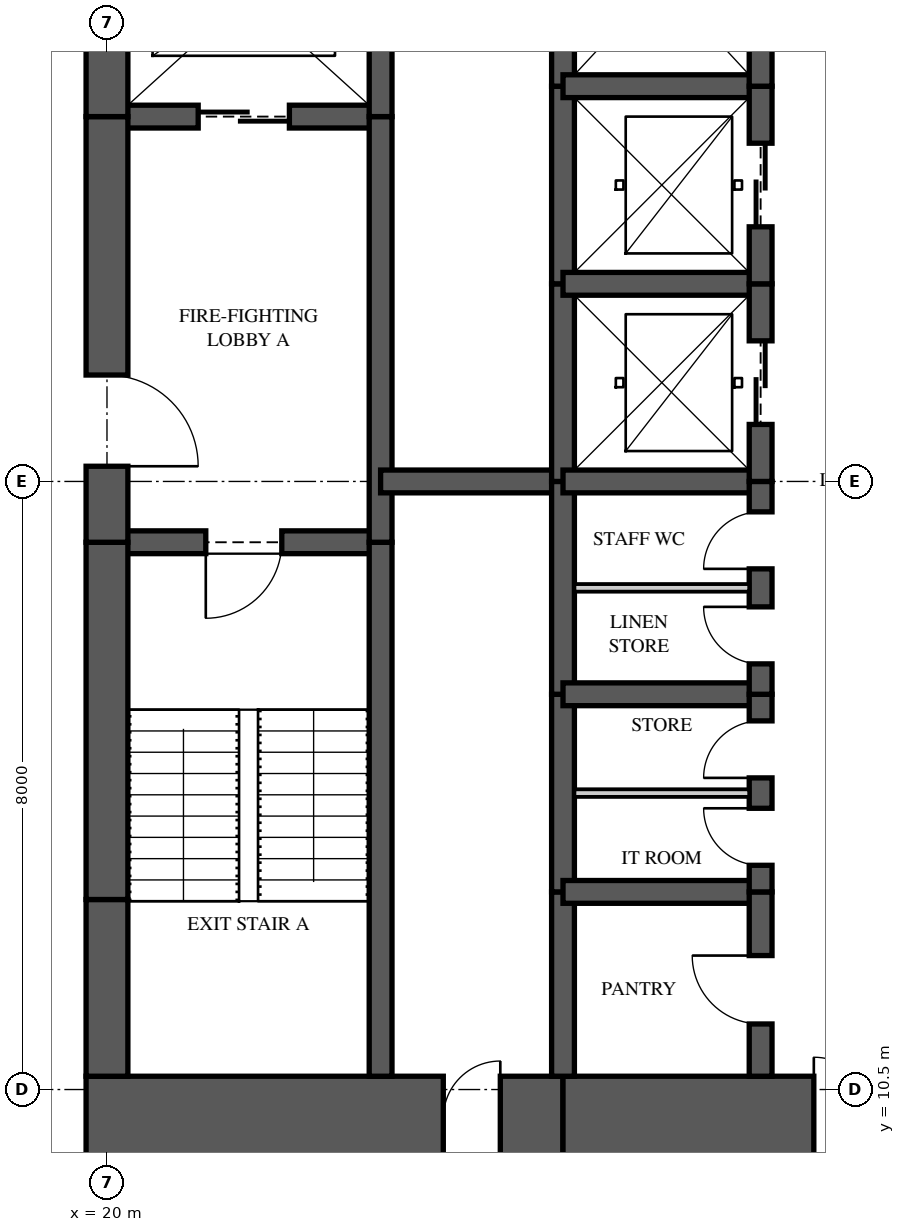
"""IFC4 building model, lengths in metres.
Left out: names, types, materials, properties, quantities, classifications, styles, units other than length and angle.
Written with IfcOpenShell. Run it as: python <this file> out.ifc"""

import sys

from ifc_helpers import new_model, si_unit, direction, frame, frame_2d, origin, place, context, subcontext, project, spatial, rectangle, extrude, element, fill, save


model = new_model("IFC4")
c1 = context("Model", 3, precision=1e-05, world=origin(), true_north=direction((0.0, 1.0)))
c2 = subcontext(c1, "Body", "Model", "MODEL_VIEW")
j1 = project(units=[si_unit("LENGTHUNIT", "METRE"), si_unit("PLANEANGLEUNIT", "RADIAN")], contexts=[c1])
p1 = place(None, origin())
s1 = spatial("IfcSite", under=j1, at=p1, CompositionType="ELEMENT")
p2 = place(p1, origin())
s2 = spatial("IfcBuilding", under=s1, at=p2, CompositionType="ELEMENT")
p3 = place(p2, frame((0.0, 0.0, 235.45)))
s3 = spatial("IfcBuildingStorey", under=s2, at=p3, CompositionType="ELEMENT", Elevation=235.45)
p4 = place(p3, frame((19.725, 10.125, 0.0), z_axis=(0.0, 0.0, 1.0), x_axis=(1.0, 0.0, 0.0)))
e1 = element("IfcWall", 1, at=p4, inside=s3, PredefinedType="SHEAR", context=c2, shape_type="SweptSolid", body=[
    extrude(rectangle(XDim=6.275, YDim=1.1, at=frame_2d((3.137, 0.0))), origin(), (0.0, 0.0, 1.0), 3.5),
])
p5 = place(p4, frame((4.7, 0.0, 0.0)))
e2 = element("IfcOpeningElement", 2, at=p5, cuts=e1, PredefinedType="OPENING", context=c2, shape_type="SweptSolid", body=[
    extrude(rectangle(XDim=0.75, YDim=2.1, at=frame_2d((0.375, 1.05))), frame((0.0, 0.56, 0.0), z_axis=(0.0, -1.0, 0.0), x_axis=(1.0, 0.0, 0.0)), (0.0, 0.0, 1.0), 1.12),
])
p6 = place(p3, frame((26.0, 10.125, 0.0), z_axis=(0.0, 0.0, 1.0), x_axis=(1.0, 0.0, 0.0)))
e3 = element("IfcWall", 3, at=p6, inside=s3, PredefinedType="SHEAR", context=c2, shape_type="SweptSolid", body=[
    extrude(rectangle(XDim=5.6, YDim=1.1, at=frame_2d((2.8, 0.0))), origin(), (0.0, 0.0, 1.0), 3.5),
])
p7 = place(p6, frame((3.3, 0.0, 0.0)))
e4 = element("IfcOpeningElement", 4, at=p7, cuts=e3, PredefinedType="OPENING", context=c2, shape_type="SweptSolid", body=[
    extrude(rectangle(XDim=1.6, YDim=2.1, at=frame_2d((0.8, 1.05))), frame((0.0, 0.56, 0.0), z_axis=(0.0, -1.0, 0.0), x_axis=(1.0, 0.0, 0.0)), (0.0, 0.0, 1.0), 1.12),
])
p8 = place(p3, frame((20.0, 26.325, 0.0), z_axis=(0.0, 0.0, 1.0), x_axis=(0.0, -1.0, 0.0)))
e5 = element("IfcWall", 5, at=p8, inside=s3, PredefinedType="SHEAR", context=c2, shape_type="SweptSolid", body=[
    extrude(rectangle(XDim=3.025, YDim=0.55, at=frame_2d((1.512, 0.0))), origin(), (0.0, 0.0, 1.0), 3.5),
])
p9 = place(p3, frame((20.0, 23.3, 0.0), z_axis=(0.0, 0.0, 1.0), x_axis=(0.0, -1.0, 0.0)))
e6 = element("IfcWall", 6, at=p9, inside=s3, PredefinedType="SHEAR", context=c2, shape_type="SweptSolid", body=[
    extrude(rectangle(XDim=5.6, YDim=0.55, at=frame_2d((2.8, 0.0))), origin(), (0.0, 0.0, 1.0), 3.5),
])
p10 = place(p9, frame((3.4, 0.0, 0.0)))
e7 = element("IfcOpeningElement", 7, at=p10, cuts=e6, PredefinedType="OPENING", context=c2, shape_type="SweptSolid", body=[
    extrude(rectangle(XDim=1.2, YDim=2.2, at=frame_2d((0.6, 1.1))), frame((0.0, 0.285, 0.0), z_axis=(0.0, -1.0, 0.0), x_axis=(1.0, 0.0, 0.0)), (0.0, 0.0, 1.0), 0.57),
])
p11 = place(p3, frame((20.0, 17.7, 0.0), z_axis=(0.0, 0.0, 1.0), x_axis=(0.0, -1.0, 0.0)))
e8 = element("IfcWall", 8, at=p11, inside=s3, PredefinedType="SHEAR", context=c2, shape_type="SweptSolid", body=[
    extrude(rectangle(XDim=4.7, YDim=0.55, at=frame_2d((2.35, 0.0))), origin(), (0.0, 0.0, 1.0), 3.5),
])
p12 = place(p3, frame((20.0, 13.0, 0.0), z_axis=(0.0, 0.0, 1.0), x_axis=(0.0, -1.0, 0.0)))
e9 = element("IfcWall", 9, at=p12, inside=s3, PredefinedType="SHEAR", context=c2, shape_type="SweptSolid", body=[
    extrude(rectangle(XDim=2.325, YDim=0.55, at=frame_2d((1.163, 0.0))), origin(), (0.0, 0.0, 1.0), 3.5),
])
p13 = place(p3, frame((23.6, 10.675, 0.0), z_axis=(0.0, 0.0, 1.0), x_axis=(0.0, 1.0, 0.0)))
e10 = element("IfcWall", 10, at=p13, inside=s3, PredefinedType="SHEAR", context=c2, shape_type="SweptSolid", body=[
    extrude(rectangle(XDim=7.025, YDim=0.3, at=frame_2d((3.512, 0.0))), origin(), (0.0, 0.0, 1.0), 3.5),
])
p14 = place(p3, frame((23.6, 17.7, 0.0), z_axis=(0.0, 0.0, 1.0), x_axis=(0.0, 1.0, 0.0)))
e11 = element("IfcWall", 11, at=p14, inside=s3, PredefinedType="SHEAR", context=c2, shape_type="SweptSolid", body=[
    extrude(rectangle(XDim=5.6, YDim=0.3, at=frame_2d((2.8, 0.0))), origin(), (0.0, 0.0, 1.0), 3.5),
])
p15 = place(p3, frame((23.6, 23.3, 0.0), z_axis=(0.0, 0.0, 1.0), x_axis=(0.0, 1.0, 0.0)))
e12 = element("IfcWall", 12, at=p15, inside=s3, PredefinedType="SHEAR", context=c2, shape_type="SweptSolid", body=[
    extrude(rectangle(XDim=3.025, YDim=0.3, at=frame_2d((1.512, 0.0))), origin(), (0.0, 0.0, 1.0), 3.5),
])
p16 = place(p3, frame((26.0, 10.675, 0.0), z_axis=(0.0, 0.0, 1.0), x_axis=(0.0, 1.0, 0.0)))
e13 = element("IfcWall", 13, at=p16, inside=s3, PredefinedType="SHEAR", context=c2, shape_type="SweptSolid", body=[
    extrude(rectangle(XDim=2.425, YDim=0.3, at=frame_2d((1.212, 0.0))), origin(), (0.0, 0.0, 1.0), 3.5),
])
p17 = place(p3, frame((26.0, 13.1, 0.0), z_axis=(0.0, 0.0, 1.0), x_axis=(0.0, 1.0, 0.0)))
e14 = element("IfcWall", 14, at=p17, inside=s3, PredefinedType="SHEAR", context=c2, shape_type="SweptSolid", body=[
    extrude(rectangle(XDim=2.6, YDim=0.3, at=frame_2d((1.3, 0.0))), origin(), (0.0, 0.0, 1.0), 3.5),
])
p18 = place(p3, frame((26.0, 15.7, 0.0), z_axis=(0.0, 0.0, 1.0), x_axis=(0.0, 1.0, 0.0)))
e15 = element("IfcWall", 15, at=p18, inside=s3, PredefinedType="SHEAR", context=c2, shape_type="SweptSolid", body=[
    extrude(rectangle(XDim=2.8, YDim=0.3, at=frame_2d((1.4, 0.0))), origin(), (0.0, 0.0, 1.0), 3.5),
])
p19 = place(p3, frame((26.0, 18.5, 0.0), z_axis=(0.0, 0.0, 1.0), x_axis=(0.0, 1.0, 0.0)))
e16 = element("IfcWall", 16, at=p19, inside=s3, PredefinedType="SHEAR", context=c2, shape_type="SweptSolid", body=[
    extrude(rectangle(XDim=2.6, YDim=0.3, at=frame_2d((1.3, 0.0))), origin(), (0.0, 0.0, 1.0), 3.5),
])
p20 = place(p3, frame((26.0, 21.1, 0.0), z_axis=(0.0, 0.0, 1.0), x_axis=(0.0, 1.0, 0.0)))
e17 = element("IfcWall", 17, at=p20, inside=s3, PredefinedType="SHEAR", context=c2, shape_type="SweptSolid", body=[
    extrude(rectangle(XDim=2.6, YDim=0.3, at=frame_2d((1.3, 0.0))), origin(), (0.0, 0.0, 1.0), 3.5),
])
p21 = place(p3, frame((26.0, 23.7, 0.0), z_axis=(0.0, 0.0, 1.0), x_axis=(0.0, 1.0, 0.0)))
e18 = element("IfcWall", 18, at=p21, inside=s3, PredefinedType="SHEAR", context=c2, shape_type="SweptSolid", body=[
    extrude(rectangle(XDim=2.625, YDim=0.3, at=frame_2d((1.312, 0.0))), origin(), (0.0, 0.0, 1.0), 3.5),
])
p22 = place(p3, frame((28.6, 10.675, 0.0), z_axis=(0.0, 0.0, 1.0), x_axis=(0.0, 1.0, 0.0)))
e19 = element("IfcWall", 19, at=p22, inside=s3, PredefinedType="SHEAR", context=c2, shape_type="SweptSolid", body=[
    extrude(rectangle(XDim=2.425, YDim=0.3, at=frame_2d((1.212, 0.0))), origin(), (0.0, 0.0, 1.0), 3.5),
])
p23 = place(p22, frame((0.688, 0.0, 0.0)))
e20 = element("IfcOpeningElement", 20, at=p23, cuts=e19, PredefinedType="OPENING", context=c2, shape_type="SweptSolid", body=[
    extrude(rectangle(XDim=0.9, YDim=2.1, at=frame_2d((0.45, 1.05))), frame((0.0, 0.16, 0.0), z_axis=(0.0, -1.0, 0.0), x_axis=(1.0, 0.0, 0.0)), (0.0, 0.0, 1.0), 0.32),
])
p24 = place(p3, frame((28.6, 13.1, 0.0), z_axis=(0.0, 0.0, 1.0), x_axis=(0.0, 1.0, 0.0)))
e21 = element("IfcWall", 21, at=p24, inside=s3, PredefinedType="SHEAR", context=c2, shape_type="SweptSolid", body=[
    extrude(rectangle(XDim=2.6, YDim=0.3, at=frame_2d((1.3, 0.0))), origin(), (0.0, 0.0, 1.0), 3.5),
])
p25 = place(p24, frame((0.35, 0.0, 0.0)))
e22 = element("IfcOpeningElement", 22, at=p25, cuts=e21, PredefinedType="OPENING", context=c2, shape_type="SweptSolid", body=[
    extrude(rectangle(XDim=0.75, YDim=2.1, at=frame_2d((0.375, 1.05))), frame((0.0, 0.16, 0.0), z_axis=(0.0, -1.0, 0.0), x_axis=(1.0, 0.0, 0.0)), (0.0, 0.0, 1.0), 0.32),
])
p26 = place(p24, frame((1.5, 0.0, 0.0)))
e23 = element("IfcOpeningElement", 23, at=p26, cuts=e21, PredefinedType="OPENING", context=c2, shape_type="SweptSolid", body=[
    extrude(rectangle(XDim=0.75, YDim=2.1, at=frame_2d((0.375, 1.05))), frame((0.0, 0.16, 0.0), z_axis=(0.0, -1.0, 0.0), x_axis=(1.0, 0.0, 0.0)), (0.0, 0.0, 1.0), 0.32),
])
p27 = place(p3, frame((28.6, 15.7, 0.0), z_axis=(0.0, 0.0, 1.0), x_axis=(0.0, 1.0, 0.0)))
e24 = element("IfcWall", 24, at=p27, inside=s3, PredefinedType="SHEAR", context=c2, shape_type="SweptSolid", body=[
    extrude(rectangle(XDim=2.8, YDim=0.3, at=frame_2d((1.4, 0.0))), origin(), (0.0, 0.0, 1.0), 3.5),
])
p28 = place(p27, frame((0.4, 0.0, 0.0)))
e25 = element("IfcOpeningElement", 25, at=p28, cuts=e24, PredefinedType="OPENING", context=c2, shape_type="SweptSolid", body=[
    extrude(rectangle(XDim=0.75, YDim=2.1, at=frame_2d((0.375, 1.05))), frame((0.0, 0.16, 0.0), z_axis=(0.0, -1.0, 0.0), x_axis=(1.0, 0.0, 0.0)), (0.0, 0.0, 1.0), 0.32),
])
p29 = place(p27, frame((1.65, 0.0, 0.0)))
e26 = element("IfcOpeningElement", 26, at=p29, cuts=e24, PredefinedType="OPENING", context=c2, shape_type="SweptSolid", body=[
    extrude(rectangle(XDim=0.75, YDim=2.1, at=frame_2d((0.375, 1.05))), frame((0.0, 0.16, 0.0), z_axis=(0.0, -1.0, 0.0), x_axis=(1.0, 0.0, 0.0)), (0.0, 0.0, 1.0), 0.32),
])
p30 = place(p3, frame((28.6, 18.5, 0.0), z_axis=(0.0, 0.0, 1.0), x_axis=(0.0, 1.0, 0.0)))
e27 = element("IfcWall", 27, at=p30, inside=s3, PredefinedType="SHEAR", context=c2, shape_type="SweptSolid", body=[
    extrude(rectangle(XDim=2.6, YDim=0.3, at=frame_2d((1.3, 0.0))), origin(), (0.0, 0.0, 1.0), 3.5),
])
p31 = place(p30, frame((0.75, 0.0, 0.0)))
e28 = element("IfcOpeningElement", 28, at=p31, cuts=e27, PredefinedType="OPENING", context=c2, shape_type="SweptSolid", body=[
    extrude(rectangle(XDim=1.1, YDim=2.1, at=frame_2d((0.55, 1.05))), frame((0.0, 0.16, 0.0), z_axis=(0.0, -1.0, 0.0), x_axis=(1.0, 0.0, 0.0)), (0.0, 0.0, 1.0), 0.32),
])
p32 = place(p3, frame((28.6, 21.1, 0.0), z_axis=(0.0, 0.0, 1.0), x_axis=(0.0, 1.0, 0.0)))
e29 = element("IfcWall", 29, at=p32, inside=s3, PredefinedType="SHEAR", context=c2, shape_type="SweptSolid", body=[
    extrude(rectangle(XDim=2.6, YDim=0.3, at=frame_2d((1.3, 0.0))), origin(), (0.0, 0.0, 1.0), 3.5),
])
p33 = place(p32, frame((0.75, 0.0, 0.0)))
e30 = element("IfcOpeningElement", 30, at=p33, cuts=e29, PredefinedType="OPENING", context=c2, shape_type="SweptSolid", body=[
    extrude(rectangle(XDim=1.1, YDim=2.1, at=frame_2d((0.55, 1.05))), frame((0.0, 0.16, 0.0), z_axis=(0.0, -1.0, 0.0), x_axis=(1.0, 0.0, 0.0)), (0.0, 0.0, 1.0), 0.32),
])
p34 = place(p3, frame((28.6, 23.7, 0.0), z_axis=(0.0, 0.0, 1.0), x_axis=(0.0, 1.0, 0.0)))
e31 = element("IfcWall", 31, at=p34, inside=s3, PredefinedType="SHEAR", context=c2, shape_type="SweptSolid", body=[
    extrude(rectangle(XDim=2.625, YDim=0.3, at=frame_2d((1.312, 0.0))), origin(), (0.0, 0.0, 1.0), 3.5),
])
p35 = place(p34, frame((0.85, 0.0, 0.0)))
e32 = element("IfcOpeningElement", 32, at=p35, cuts=e31, PredefinedType="OPENING", context=c2, shape_type="SweptSolid", body=[
    extrude(rectangle(XDim=1.1, YDim=2.1, at=frame_2d((0.55, 1.05))), frame((0.0, 0.16, 0.0), z_axis=(0.0, -1.0, 0.0), x_axis=(1.0, 0.0, 0.0)), (0.0, 0.0, 1.0), 0.32),
])
p36 = place(p3, frame((20.0, 17.7, 0.0), z_axis=(0.0, 0.0, 1.0), x_axis=(1.0, 0.0, 0.0)))
e33 = element("IfcWall", 33, at=p36, inside=s3, PredefinedType="SHEAR", context=c2, shape_type="SweptSolid", body=[
    extrude(rectangle(XDim=3.6, YDim=0.3, at=frame_2d((1.8, 0.0))), origin(), (0.0, 0.0, 1.0), 3.5),
])
p37 = place(p36, frame((1.3, 0.0, 0.0)))
e34 = element("IfcOpeningElement", 34, at=p37, cuts=e33, PredefinedType="OPENING", context=c2, shape_type="SweptSolid", body=[
    extrude(rectangle(XDim=1.0, YDim=2.1, at=frame_2d((0.5, 1.05))), frame((0.0, 0.16, 0.0), z_axis=(0.0, -1.0, 0.0), x_axis=(1.0, 0.0, 0.0)), (0.0, 0.0, 1.0), 0.32),
])
p38 = place(p3, frame((20.0, 23.3, 0.0), z_axis=(0.0, 0.0, 1.0), x_axis=(1.0, 0.0, 0.0)))
e35 = element("IfcWall", 35, at=p38, inside=s3, PredefinedType="SHEAR", context=c2, shape_type="SweptSolid", body=[
    extrude(rectangle(XDim=3.6, YDim=0.3, at=frame_2d((1.8, 0.0))), origin(), (0.0, 0.0, 1.0), 3.5),
])
p39 = place(p38, frame((1.2, 0.0, 0.0)))
e36 = element("IfcOpeningElement", 36, at=p39, cuts=e35, PredefinedType="OPENING", context=c2, shape_type="SweptSolid", body=[
    extrude(rectangle(XDim=1.2, YDim=2.1, at=frame_2d((0.6, 1.05))), frame((0.0, 0.16, 0.0), z_axis=(0.0, -1.0, 0.0), x_axis=(1.0, 0.0, 0.0)), (0.0, 0.0, 1.0), 0.32),
])
p40 = place(p3, frame((23.6, 18.5, 0.0), z_axis=(0.0, 0.0, 1.0), x_axis=(1.0, 0.0, 0.0)))
e37 = element("IfcWall", 37, at=p40, inside=s3, PredefinedType="SHEAR", context=c2, shape_type="SweptSolid", body=[
    extrude(rectangle(XDim=2.4, YDim=0.3, at=frame_2d((1.2, 0.0))), origin(), (0.0, 0.0, 1.0), 3.5),
])
for number, where, z_axis, x_axis in (
    (38, (26.0, 13.1, 0.0), (0.0, 0.0, 1.0), (1.0, 0.0, 0.0)),
    (39, (26.0, 15.7, 0.0), (0.0, 0.0, 1.0), (1.0, 0.0, 0.0)),
    (40, (26.0, 18.5, 0.0), (0.0, 0.0, 1.0), (1.0, 0.0, 0.0)),
    (41, (26.0, 21.1, 0.0), (0.0, 0.0, 1.0), (1.0, 0.0, 0.0)),
    (42, (26.0, 23.7, 0.0), (0.0, 0.0, 1.0), (1.0, 0.0, 0.0)),
):
    element("IfcWall", number, at=place(p3, frame(where, z_axis=z_axis, x_axis=x_axis)), inside=s3, PredefinedType="SHEAR", context=c2, shape_type="SweptSolid", body=[
        extrude(rectangle(XDim=2.6, YDim=0.3, at=frame_2d((1.3, 0.0))), origin(), (0.0, 0.0, 1.0), 3.5),
    ])
for number, where, z_axis, x_axis in (
    (43, (26.15, 14.4, 0.0), (0.0, 0.0, 1.0), (1.0, 0.0, 0.0)),
    (44, (26.15, 17.1, 0.0), (0.0, 0.0, 1.0), (1.0, 0.0, 0.0)),
):
    element("IfcWall", number, at=place(p3, frame(where, z_axis=z_axis, x_axis=x_axis)), inside=s3, PredefinedType="PARTITIONING", context=c2, shape_type="SweptSolid", body=[
        extrude(rectangle(XDim=2.3, YDim=0.1, at=frame_2d((1.15, 0.0))), origin(), (0.0, 0.0, 1.0), 3.26),
    ])
p41 = place(p37, frame((1.0, 0.0, 0.0), z_axis=(0.0, 0.0, 1.0), x_axis=(-1.0, 0.0, 0.0)))
e45 = element("IfcDoor", 45, at=p41, inside=s3, OperationType="SINGLE_SWING_RIGHT", PredefinedType="DOOR", context=c2, shape_type="SweptSolid", body=[
    extrude(rectangle(XDim=1.0, YDim=2.1, at=frame_2d((0.5, 1.05))), frame((0.0, 0.025, 0.0), z_axis=(0.0, -1.0, 0.0), x_axis=(1.0, 0.0, 0.0)), (0.0, 0.0, 1.0), 0.05),
])
fill(e34, e45)
p42 = place(p10, origin())
e46 = element("IfcDoor", 46, at=p42, inside=s3, OperationType="SINGLE_SWING_RIGHT", PredefinedType="DOOR", context=c2, shape_type="SweptSolid", body=[
    extrude(rectangle(XDim=1.2, YDim=2.2, at=frame_2d((0.6, 1.1))), frame((0.0, 0.025, 0.0), z_axis=(0.0, -1.0, 0.0), x_axis=(1.0, 0.0, 0.0)), (0.0, 0.0, 1.0), 0.05),
])
fill(e7, e46)
p43 = place(p39, origin())
e47 = element("IfcDoor", 47, at=p43, inside=s3, OperationType="SLIDING_TO_LEFT", PredefinedType="DOOR", context=c2, shape_type="SweptSolid", body=[
    extrude(rectangle(XDim=1.2, YDim=2.1, at=frame_2d((0.6, 1.05))), frame((0.0, 0.025, 0.0), z_axis=(0.0, -1.0, 0.0), x_axis=(1.0, 0.0, 0.0)), (0.0, 0.0, 1.0), 0.05),
])
fill(e36, e47)
p44 = place(p31, origin())
e48 = element("IfcDoor", 48, at=p44, inside=s3, OperationType="SLIDING_TO_LEFT", PredefinedType="DOOR", context=c2, shape_type="SweptSolid", body=[
    extrude(rectangle(XDim=1.1, YDim=2.1, at=frame_2d((0.55, 1.05))), frame((0.0, 0.025, 0.0), z_axis=(0.0, -1.0, 0.0), x_axis=(1.0, 0.0, 0.0)), (0.0, 0.0, 1.0), 0.05),
])
fill(e28, e48)
p45 = place(p33, origin())
e49 = element("IfcDoor", 49, at=p45, inside=s3, OperationType="SLIDING_TO_LEFT", PredefinedType="DOOR", context=c2, shape_type="SweptSolid", body=[
    extrude(rectangle(XDim=1.1, YDim=2.1, at=frame_2d((0.55, 1.05))), frame((0.0, 0.025, 0.0), z_axis=(0.0, -1.0, 0.0), x_axis=(1.0, 0.0, 0.0)), (0.0, 0.0, 1.0), 0.05),
])
fill(e30, e49)
p46 = place(p23, origin())
e50 = element("IfcDoor", 50, at=p46, inside=s3, OperationType="SINGLE_SWING_RIGHT", PredefinedType="DOOR", context=c2, shape_type="SweptSolid", body=[
    extrude(rectangle(XDim=0.9, YDim=2.1, at=frame_2d((0.45, 1.05))), frame((0.0, 0.025, 0.0), z_axis=(0.0, -1.0, 0.0), x_axis=(1.0, 0.0, 0.0)), (0.0, 0.0, 1.0), 0.05),
])
fill(e20, e50)
p47 = place(p25, origin())
e51 = element("IfcDoor", 51, at=p47, inside=s3, OperationType="SINGLE_SWING_RIGHT", PredefinedType="DOOR", context=c2, shape_type="SweptSolid", body=[
    extrude(rectangle(XDim=0.75, YDim=2.1, at=frame_2d((0.375, 1.05))), frame((0.0, 0.025, 0.0), z_axis=(0.0, -1.0, 0.0), x_axis=(1.0, 0.0, 0.0)), (0.0, 0.0, 1.0), 0.05),
])
fill(e22, e51)
p48 = place(p26, origin())
e52 = element("IfcDoor", 52, at=p48, inside=s3, OperationType="SINGLE_SWING_LEFT", PredefinedType="DOOR", context=c2, shape_type="SweptSolid", body=[
    extrude(rectangle(XDim=0.75, YDim=2.1, at=frame_2d((0.375, 1.05))), frame((0.0, 0.025, 0.0), z_axis=(0.0, -1.0, 0.0), x_axis=(1.0, 0.0, 0.0)), (0.0, 0.0, 1.0), 0.05),
])
fill(e23, e52)
p49 = place(p28, origin())
e53 = element("IfcDoor", 53, at=p49, inside=s3, OperationType="SINGLE_SWING_RIGHT", PredefinedType="DOOR", context=c2, shape_type="SweptSolid", body=[
    extrude(rectangle(XDim=0.75, YDim=2.1, at=frame_2d((0.375, 1.05))), frame((0.0, 0.025, 0.0), z_axis=(0.0, -1.0, 0.0), x_axis=(1.0, 0.0, 0.0)), (0.0, 0.0, 1.0), 0.05),
])
fill(e25, e53)
p50 = place(p29, origin())
e54 = element("IfcDoor", 54, at=p50, inside=s3, OperationType="SINGLE_SWING_LEFT", PredefinedType="DOOR", context=c2, shape_type="SweptSolid", body=[
    extrude(rectangle(XDim=0.75, YDim=2.1, at=frame_2d((0.375, 1.05))), frame((0.0, 0.025, 0.0), z_axis=(0.0, -1.0, 0.0), x_axis=(1.0, 0.0, 0.0)), (0.0, 0.0, 1.0), 0.05),
])
fill(e26, e54)
p51 = place(p7, origin())
e55 = element("IfcDoor", 55, at=p51, inside=s3, OperationType="DOUBLE_DOOR_SINGLE_SWING", PredefinedType="DOOR", context=c2, shape_type="SweptSolid", body=[
    extrude(rectangle(XDim=1.6, YDim=2.1, at=frame_2d((0.8, 1.05))), frame((0.0, 0.025, 0.0), z_axis=(0.0, -1.0, 0.0), x_axis=(1.0, 0.0, 0.0)), (0.0, 0.0, 1.0), 0.05),
])
fill(e4, e55)
p52 = place(p5, origin())
e56 = element("IfcDoor", 56, at=p52, inside=s3, OperationType="SINGLE_SWING_RIGHT", PredefinedType="DOOR", context=c2, shape_type="SweptSolid", body=[
    extrude(rectangle(XDim=0.75, YDim=2.1, at=frame_2d((0.375, 1.05))), frame((0.0, 0.025, 0.0), z_axis=(0.0, -1.0, 0.0), x_axis=(1.0, 0.0, 0.0)), (0.0, 0.0, 1.0), 0.05),
])
fill(e2, e56)
save(model, sys.argv[1])
